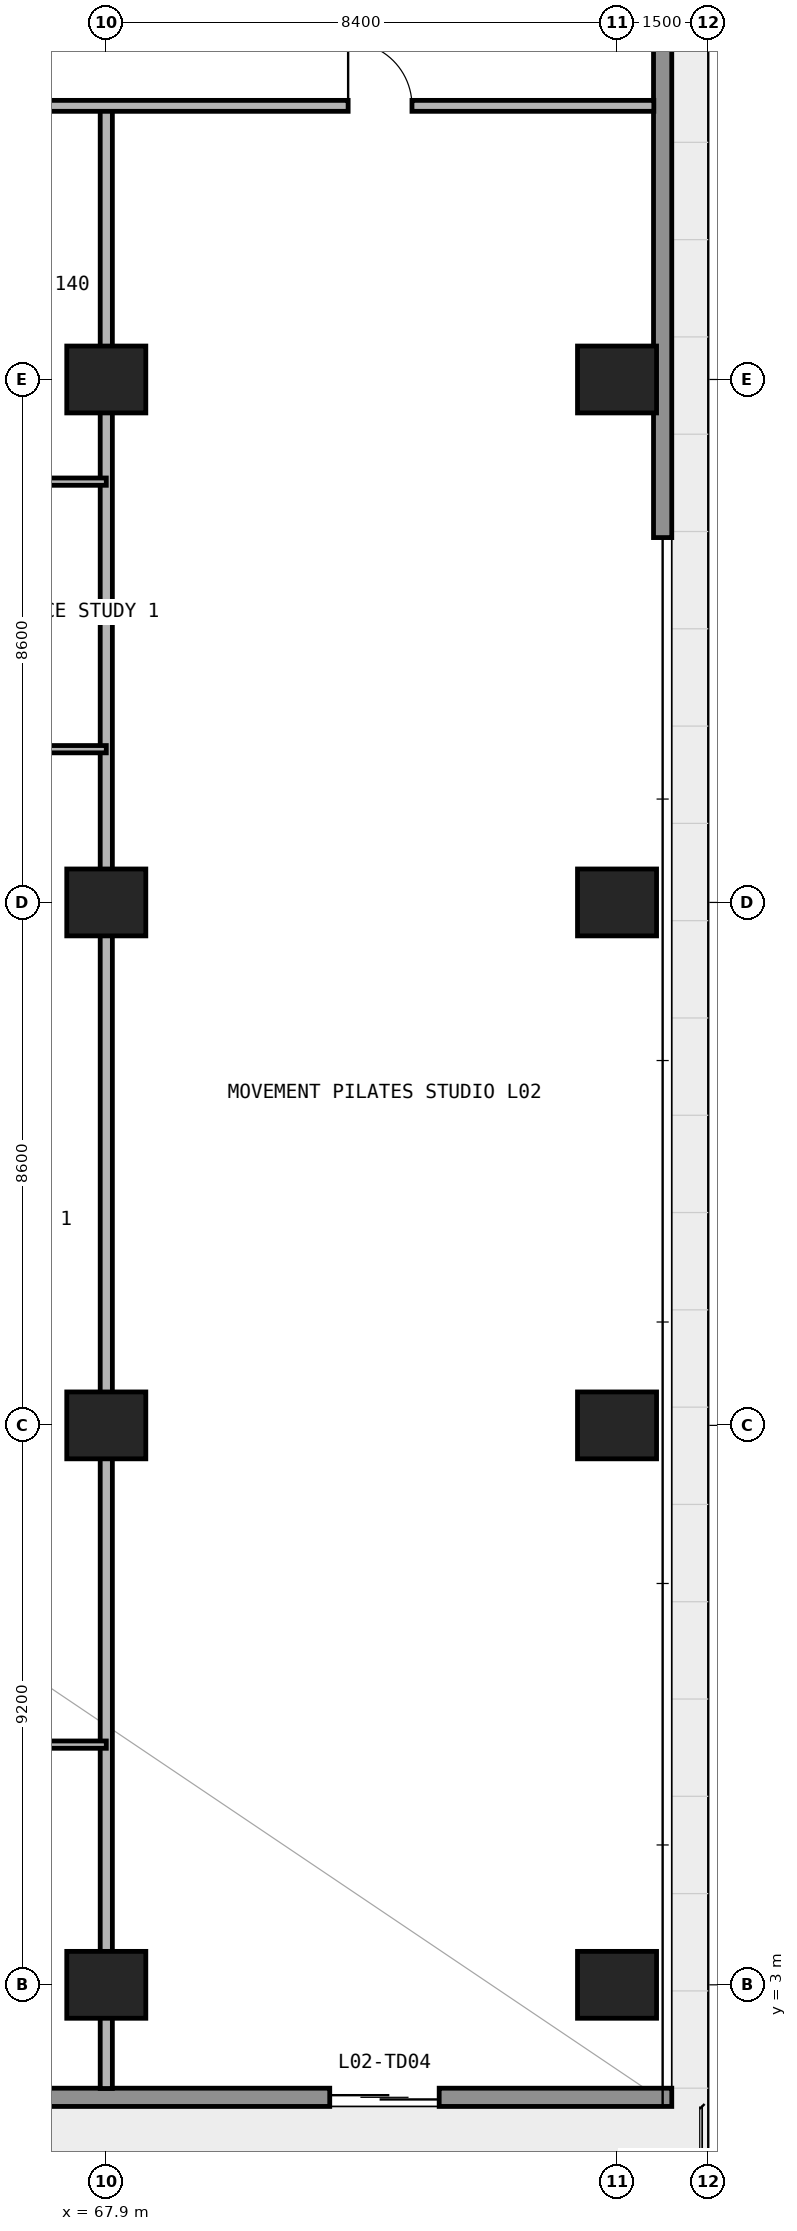
"""IFC4 building model, lengths in metres.
Left out: names, types, materials, properties, quantities, classifications, styles, units other than length and angle.
Written with IfcOpenShell. Run it as: python <this file> out.ifc"""

import sys

from ifc_helpers import new_model, si_unit, direction, frame, frame_2d, origin, origin_2d, place, context, subcontext, project, spatial, rectangle, extrude, element, fill, save


model = new_model("IFC4")
c1 = context("Model", 3, precision=1e-05, world=origin(), true_north=direction((0.0, 1.0)))
c2 = subcontext(c1, "Body", "Model", "MODEL_VIEW")
j1 = project(units=[si_unit("LENGTHUNIT", "METRE"), si_unit("PLANEANGLEUNIT", "RADIAN")], contexts=[c1])
p1 = place(None, origin())
s1 = spatial("IfcSite", under=j1, at=p1, CompositionType="ELEMENT")
p2 = place(p1, origin())
s2 = spatial("IfcBuilding", under=s1, at=p2, CompositionType="ELEMENT")
p3 = place(p2, frame((0.0, 0.0, 10.2)))
s3 = spatial("IfcBuildingStorey", under=s2, at=p3, CompositionType="ELEMENT", Elevation=10.2)
for number, where, z_axis, x_axis in (
    (1, (67.9, 3.0, 0.0), (0.0, 0.0, 1.0), (1.0, 0.0, 0.0)),
    (2, (76.3, 3.0, 0.0), (0.0, 0.0, 1.0), (1.0, 0.0, 0.0)),
    (3, (67.9, 12.2, 0.0), (0.0, 0.0, 1.0), (1.0, 0.0, 0.0)),
    (4, (76.3, 12.2, 0.0), (0.0, 0.0, 1.0), (1.0, 0.0, 0.0)),
    (5, (67.9, 20.8, 0.0), (0.0, 0.0, 1.0), (1.0, 0.0, 0.0)),
    (6, (76.3, 20.8, 0.0), (0.0, 0.0, 1.0), (1.0, 0.0, 0.0)),
    (7, (67.9, 29.4, 0.0), (0.0, 0.0, 1.0), (1.0, 0.0, 0.0)),
    (8, (76.3, 29.4, 0.0), (0.0, 0.0, 1.0), (1.0, 0.0, 0.0)),
):
    element("IfcColumn", number, at=place(p3, frame(where, z_axis=z_axis, x_axis=x_axis)), inside=s3, PredefinedType="COLUMN", context=c2, shape_type="SweptSolid", body=[
        extrude(rectangle(XDim=1.3, YDim=1.1, at=origin_2d()), origin(), (0.0, 0.0, 1.0), 4.5),
    ])
p4 = place(p3, frame((77.2, 1.15, 0.0), z_axis=(0.0, 0.0, 1.0), x_axis=(-1.0, 0.0, 0.0)))
e9 = element("IfcWall", 9, at=p4, inside=s3, PredefinedType="STANDARD", context=c2, shape_type="SweptSolid", body=[
    extrude(rectangle(XDim=76.6, YDim=0.3, at=frame_2d((38.3, 0.0))), origin(), (0.0, 0.0, 1.0), 4.5),
])
p5 = place(p4, frame((70.375, 0.0, 0.85)))
e10 = element("IfcOpeningElement", 10, at=p5, cuts=e9, PredefinedType="OPENING", context=c2, shape_type="SweptSolid", body=[
    extrude(rectangle(XDim=3.0, YDim=2.4, at=frame_2d((1.5, 1.2))), frame((0.0, 0.16, 0.0), z_axis=(0.0, -1.0, 0.0), x_axis=(1.0, 0.0, 0.0)), (0.0, 0.0, 1.0), 0.32),
])
p6 = place(p4, frame((62.2, 0.0, 0.0)))
e11 = element("IfcOpeningElement", 11, at=p6, cuts=e9, PredefinedType="OPENING", context=c2, shape_type="SweptSolid", body=[
    extrude(rectangle(XDim=1.8, YDim=2.3, at=frame_2d((0.9, 1.15))), frame((0.0, 0.16, 0.0), z_axis=(0.0, -1.0, 0.0), x_axis=(1.0, 0.0, 0.0)), (0.0, 0.0, 1.0), 0.32),
])
p7 = place(p4, frame((53.6, 0.0, 0.85)))
e12 = element("IfcOpeningElement", 12, at=p7, cuts=e9, PredefinedType="OPENING", context=c2, shape_type="SweptSolid", body=[
    extrude(rectangle(XDim=2.2, YDim=1.55, at=frame_2d((1.1, 0.775))), frame((0.0, 0.16, 0.0), z_axis=(0.0, -1.0, 0.0), x_axis=(1.0, 0.0, 0.0)), (0.0, 0.0, 1.0), 0.32),
])
p8 = place(p4, frame((37.4, 0.0, 0.0)))
e13 = element("IfcOpeningElement", 13, at=p8, cuts=e9, PredefinedType="OPENING", context=c2, shape_type="SweptSolid", body=[
    extrude(rectangle(XDim=1.8, YDim=2.3, at=frame_2d((0.9, 1.15))), frame((0.0, 0.16, 0.0), z_axis=(0.0, -1.0, 0.0), x_axis=(1.0, 0.0, 0.0)), (0.0, 0.0, 1.0), 0.32),
])
p9 = place(p4, frame((21.0, 0.0, 0.0)))
e14 = element("IfcOpeningElement", 14, at=p9, cuts=e9, PredefinedType="OPENING", context=c2, shape_type="SweptSolid", body=[
    extrude(rectangle(XDim=1.8, YDim=2.3, at=frame_2d((0.9, 1.15))), frame((0.0, 0.16, 0.0), z_axis=(0.0, -1.0, 0.0), x_axis=(1.0, 0.0, 0.0)), (0.0, 0.0, 1.0), 0.32),
])
p10 = place(p4, frame((12.4, 0.0, 0.85)))
e15 = element("IfcOpeningElement", 15, at=p10, cuts=e9, PredefinedType="OPENING", context=c2, shape_type="SweptSolid", body=[
    extrude(rectangle(XDim=2.2, YDim=1.55, at=frame_2d((1.1, 0.775))), frame((0.0, 0.16, 0.0), z_axis=(0.0, -1.0, 0.0), x_axis=(1.0, 0.0, 0.0)), (0.0, 0.0, 1.0), 0.32),
])
p11 = place(p4, frame((3.825, 0.0, 0.0)))
e16 = element("IfcOpeningElement", 16, at=p11, cuts=e9, PredefinedType="OPENING", context=c2, shape_type="SweptSolid", body=[
    extrude(rectangle(XDim=1.8, YDim=2.3, at=frame_2d((0.9, 1.15))), frame((0.0, 0.16, 0.0), z_axis=(0.0, -1.0, 0.0), x_axis=(1.0, 0.0, 0.0)), (0.0, 0.0, 1.0), 0.32),
])
p12 = place(p3, frame((77.05, 52.6, 0.0), z_axis=(0.0, 0.0, 1.0), x_axis=(0.0, -1.0, 0.0)))
e17 = element("IfcWall", 17, at=p12, inside=s3, PredefinedType="STANDARD", context=c2, shape_type="SweptSolid", body=[
    extrude(rectangle(XDim=25.8, YDim=0.3, at=frame_2d((12.9, 0.0))), origin(), (0.0, 0.0, 1.0), 4.5),
])
p13 = place(p3, frame((67.9, 1.295, 0.0), z_axis=(0.0, 0.0, 1.0), x_axis=(0.0, 1.0, 0.0)))
e18 = element("IfcWall", 18, at=p13, inside=s3, PredefinedType="PARTITIONING", context=c2, shape_type="SweptSolid", body=[
    extrude(rectangle(XDim=32.605, YDim=0.2, at=frame_2d((16.302, 0.0))), origin(), (0.0, 0.0, 1.0), 3.464),
])
p14 = place(p3, frame((59.5, 6.95, 0.0), z_axis=(0.0, 0.0, 1.0), x_axis=(1.0, 0.0, 0.0)))
e19 = element("IfcWall", 19, at=p14, inside=s3, PredefinedType="PARTITIONING", context=c2, shape_type="SweptSolid", body=[
    extrude(rectangle(XDim=8.4, YDim=0.12, at=frame_2d((4.2, 0.0))), origin(), (0.0, 0.0, 1.0), 4.5),
])
p15 = place(p14, frame((3.75, 0.0, 0.0)))
e20 = element("IfcOpeningElement", 20, at=p15, cuts=e19, PredefinedType="OPENING", context=c2, shape_type="SweptSolid", body=[
    extrude(rectangle(XDim=0.9, YDim=2.15, at=frame_2d((0.45, 1.075))), frame((0.0, 0.07, 0.0), z_axis=(0.0, -1.0, 0.0), x_axis=(1.0, 0.0, 0.0)), (0.0, 0.0, 1.0), 0.14),
])
p16 = place(p3, frame((59.505, 23.32, 0.0), z_axis=(0.0, 0.0, 1.0), x_axis=(1.0, 0.0, 0.0)))
e21 = element("IfcWall", 21, at=p16, inside=s3, PredefinedType="PARTITIONING", context=c2, shape_type="SweptSolid", body=[
    extrude(rectangle(XDim=8.395, YDim=0.12, at=frame_2d((4.198, 0.0))), origin(), (0.0, 0.0, 1.0), 4.5),
])
p17 = place(p16, frame((3.748, 0.0, 0.0)))
e22 = element("IfcOpeningElement", 22, at=p17, cuts=e21, PredefinedType="OPENING", context=c2, shape_type="SweptSolid", body=[
    extrude(rectangle(XDim=0.9, YDim=2.15, at=frame_2d((0.45, 1.075))), frame((0.0, 0.07, 0.0), z_axis=(0.0, -1.0, 0.0), x_axis=(1.0, 0.0, 0.0)), (0.0, 0.0, 1.0), 0.14),
])
p18 = place(p3, frame((59.5, 27.72, 0.0), z_axis=(0.0, 0.0, 1.0), x_axis=(1.0, 0.0, 0.0)))
e23 = element("IfcWall", 23, at=p18, inside=s3, PredefinedType="PARTITIONING", context=c2, shape_type="SweptSolid", body=[
    extrude(rectangle(XDim=8.4, YDim=0.12, at=frame_2d((4.2, 0.0))), origin(), (0.0, 0.0, 1.0), 4.5),
])
p19 = place(p18, frame((2.933, 0.0, 0.0)))
e24 = element("IfcOpeningElement", 24, at=p19, cuts=e23, PredefinedType="OPENING", context=c2, shape_type="SweptSolid", body=[
    extrude(rectangle(XDim=0.9, YDim=2.15, at=frame_2d((0.45, 1.075))), frame((0.0, 0.07, 0.0), z_axis=(0.0, -1.0, 0.0), x_axis=(1.0, 0.0, 0.0)), (0.0, 0.0, 1.0), 0.14),
])
p20 = place(p3, frame((0.895, 33.9, 0.0), z_axis=(0.0, 0.0, 1.0), x_axis=(1.0, 0.0, 0.0)))
e25 = element("IfcWall", 25, at=p20, inside=s3, PredefinedType="PARTITIONING", context=c2, shape_type="SweptSolid", body=[
    extrude(rectangle(XDim=76.01, YDim=0.18, at=frame_2d((38.005, 0.0))), origin(), (0.0, 0.0, 1.0), 4.5),
])
p21 = place(p20, frame((3.978, 0.0, 0.0)))
e26 = element("IfcOpeningElement", 26, at=p21, cuts=e25, PredefinedType="OPENING", context=c2, shape_type="SweptSolid", body=[
    extrude(rectangle(XDim=1.05, YDim=2.15, at=frame_2d((0.525, 1.075))), frame((0.0, 0.1, 0.0), z_axis=(0.0, -1.0, 0.0), x_axis=(1.0, 0.0, 0.0)), (0.0, 0.0, 1.0), 0.2),
])
p22 = place(p20, frame((11.695, 0.0, 0.0)))
e27 = element("IfcOpeningElement", 27, at=p22, cuts=e25, PredefinedType="OPENING", context=c2, shape_type="SweptSolid", body=[
    extrude(rectangle(XDim=1.0, YDim=2.2, at=frame_2d((0.5, 1.1))), frame((0.0, 0.1, 0.0), z_axis=(0.0, -1.0, 0.0), x_axis=(1.0, 0.0, 0.0)), (0.0, 0.0, 1.0), 0.2),
])
p23 = place(p20, frame((37.48, 0.0, 0.0)))
e28 = element("IfcOpeningElement", 28, at=p23, cuts=e25, PredefinedType="OPENING", context=c2, shape_type="SweptSolid", body=[
    extrude(rectangle(XDim=1.05, YDim=2.15, at=frame_2d((0.525, 1.075))), frame((0.0, 0.1, 0.0), z_axis=(0.0, -1.0, 0.0), x_axis=(1.0, 0.0, 0.0)), (0.0, 0.0, 1.0), 0.2),
])
p24 = place(p20, frame((53.085, 0.0, 0.0)))
e29 = element("IfcOpeningElement", 29, at=p24, cuts=e25, PredefinedType="OPENING", context=c2, shape_type="SweptSolid", body=[
    extrude(rectangle(XDim=1.0, YDim=2.2, at=frame_2d((0.5, 1.1))), frame((0.0, 0.1, 0.0), z_axis=(0.0, -1.0, 0.0), x_axis=(1.0, 0.0, 0.0)), (0.0, 0.0, 1.0), 0.2),
])
p25 = place(p20, frame((70.982, 0.0, 0.0)))
e30 = element("IfcOpeningElement", 30, at=p25, cuts=e25, PredefinedType="OPENING", context=c2, shape_type="SweptSolid", body=[
    extrude(rectangle(XDim=1.05, YDim=2.15, at=frame_2d((0.525, 1.075))), frame((0.0, 0.1, 0.0), z_axis=(0.0, -1.0, 0.0), x_axis=(1.0, 0.0, 0.0)), (0.0, 0.0, 1.0), 0.2),
])
p26 = place(p11, origin())
e31 = element("IfcDoor", 31, at=p26, inside=s3, OperationType="DOUBLE_DOOR_SLIDING", PredefinedType="DOOR", context=c2, shape_type="SweptSolid", body=[
    extrude(rectangle(XDim=1.8, YDim=2.3, at=frame_2d((0.9, 1.15))), frame((0.0, 0.025, 0.0), z_axis=(0.0, -1.0, 0.0), x_axis=(1.0, 0.0, 0.0)), (0.0, 0.0, 1.0), 0.05),
])
fill(e16, e31)
p27 = place(p25, origin())
e32 = element("IfcDoor", 32, at=p27, inside=s3, OperationType="SINGLE_SWING_LEFT", PredefinedType="DOOR", context=c2, shape_type="SweptSolid", body=[
    extrude(rectangle(XDim=1.05, YDim=2.15, at=frame_2d((0.525, 1.075))), frame((0.0, 0.025, 0.0), z_axis=(0.0, -1.0, 0.0), x_axis=(1.0, 0.0, 0.0)), (0.0, 0.0, 1.0), 0.05),
])
fill(e30, e32)
save(model, sys.argv[1])
